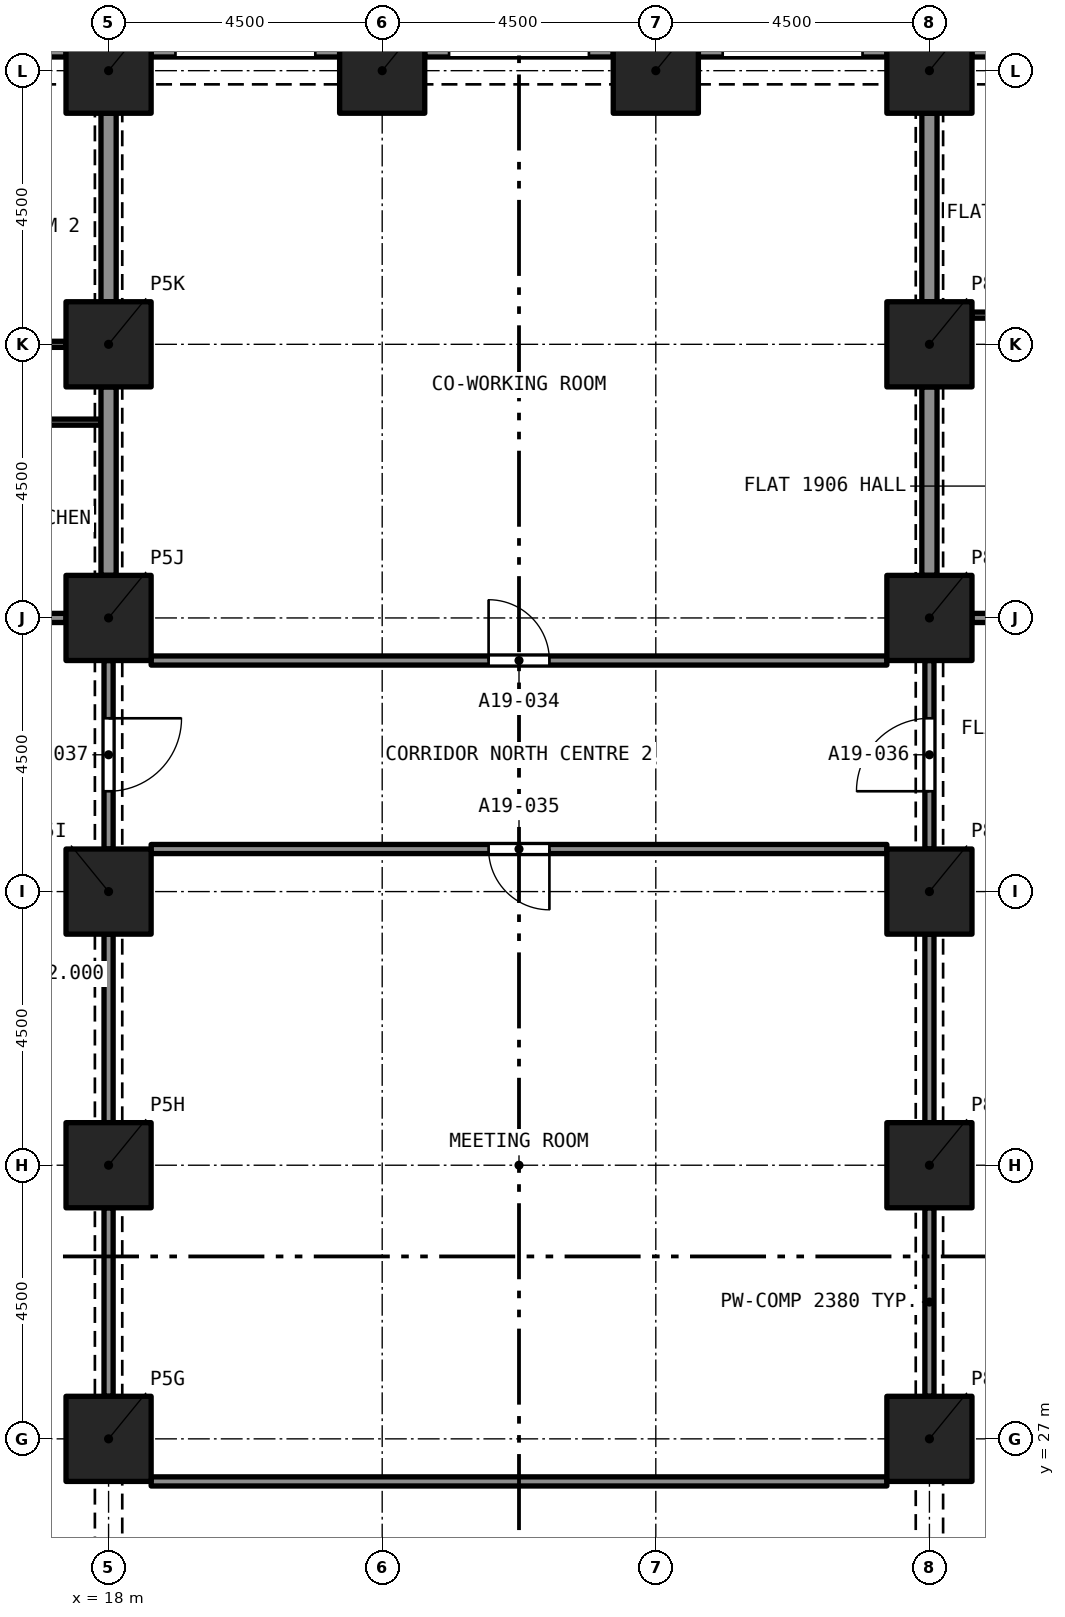
"""IFC4 building model, lengths in metres.
Left out: names, types, materials, properties, quantities, classifications, styles, units other than length and angle.
Written with IfcOpenShell. Run it as: python <this file> out.ifc"""

import sys

from ifc_helpers import new_model, si_unit, direction, frame, frame_2d, origin, origin_2d, place, context, subcontext, project, spatial, rectangle, extrude, element, fill, save


model = new_model("IFC4")
c1 = context("Model", 3, precision=1e-05, world=origin(), true_north=direction((0.0, 1.0)))
c2 = subcontext(c1, "Body", "Model", "MODEL_VIEW")
j1 = project(units=[si_unit("LENGTHUNIT", "METRE"), si_unit("PLANEANGLEUNIT", "RADIAN")], contexts=[c1])
p1 = place(None, origin())
s1 = spatial("IfcSite", under=j1, at=p1, CompositionType="ELEMENT")
p2 = place(p1, origin())
s2 = spatial("IfcBuilding", under=s1, at=p2, CompositionType="ELEMENT")
p3 = place(p2, frame((0.0, 0.0, 72.0)))
s3 = spatial("IfcBuildingStorey", under=s2, at=p3, CompositionType="ELEMENT", Elevation=72.0)
for number, where, z_axis, x_axis in (
    (1, (18.0, 27.0, 0.0), (0.0, 0.0, 1.0), (1.0, 0.0, 0.0)),
    (2, (31.5, 27.0, 0.0), (0.0, 0.0, 1.0), (1.0, 0.0, 0.0)),
    (3, (18.0, 31.5, 0.0), (0.0, 0.0, 1.0), (1.0, 0.0, 0.0)),
    (4, (31.5, 31.5, 0.0), (0.0, 0.0, 1.0), (1.0, 0.0, 0.0)),
    (5, (18.0, 36.0, 0.0), (0.0, 0.0, 1.0), (1.0, 0.0, 0.0)),
    (6, (31.5, 36.0, 0.0), (0.0, 0.0, 1.0), (1.0, 0.0, 0.0)),
    (7, (18.0, 40.5, 0.0), (0.0, 0.0, 1.0), (1.0, 0.0, 0.0)),
    (8, (31.5, 40.5, 0.0), (0.0, 0.0, 1.0), (1.0, 0.0, 0.0)),
    (9, (18.0, 45.0, 0.0), (0.0, 0.0, 1.0), (1.0, 0.0, 0.0)),
    (10, (31.5, 45.0, 0.0), (0.0, 0.0, 1.0), (1.0, 0.0, 0.0)),
    (11, (18.0, 49.5, 0.0), (0.0, 0.0, 1.0), (1.0, 0.0, 0.0)),
    (12, (22.5, 49.5, 0.0), (0.0, 0.0, 1.0), (1.0, 0.0, 0.0)),
    (13, (27.0, 49.5, 0.0), (0.0, 0.0, 1.0), (1.0, 0.0, 0.0)),
    (14, (31.5, 49.5, 0.0), (0.0, 0.0, 1.0), (1.0, 0.0, 0.0)),
):
    element("IfcColumn", number, at=place(p3, frame(where, z_axis=z_axis, x_axis=x_axis)), inside=s3, PredefinedType="COLUMN", context=c2, shape_type="SweptSolid", body=[
        extrude(rectangle(XDim=1.4, YDim=1.4, at=origin_2d()), origin(), (0.0, 0.0, 1.0), 3.2),
    ])
p4 = place(p3, frame((32.2, 49.875, 0.0), z_axis=(0.0, 0.0, 1.0), x_axis=(1.0, 0.0, 0.0)))
e15 = element("IfcWall", 15, at=p4, inside=s3, PredefinedType="SOLIDWALL", context=c2, shape_type="SweptSolid", body=[
    extrude(rectangle(XDim=3.1, YDim=0.3, at=frame_2d((1.55, 0.0))), origin(), (0.0, 0.0, 1.0), 3.2),
])
p5 = place(p4, frame((0.4, 0.0, 0.45)))
e16 = element("IfcOpeningElement", 16, at=p5, cuts=e15, PredefinedType="OPENING", context=c2, shape_type="SweptSolid", body=[
    extrude(rectangle(XDim=2.3, YDim=1.95, at=frame_2d((1.15, 0.975))), frame((0.0, 0.16, 0.0), z_axis=(0.0, -1.0, 0.0), x_axis=(1.0, 0.0, 0.0)), (0.0, 0.0, 1.0), 0.32),
])
p6 = place(p3, frame((27.7, 49.875, 0.0), z_axis=(0.0, 0.0, 1.0), x_axis=(1.0, 0.0, 0.0)))
e17 = element("IfcWall", 17, at=p6, inside=s3, PredefinedType="SOLIDWALL", context=c2, shape_type="SweptSolid", body=[
    extrude(rectangle(XDim=3.1, YDim=0.3, at=frame_2d((1.55, 0.0))), origin(), (0.0, 0.0, 1.0), 3.2),
])
p7 = place(p6, frame((0.4, 0.0, 0.45)))
e18 = element("IfcOpeningElement", 18, at=p7, cuts=e17, PredefinedType="OPENING", context=c2, shape_type="SweptSolid", body=[
    extrude(rectangle(XDim=2.3, YDim=1.95, at=frame_2d((1.15, 0.975))), frame((0.0, 0.16, 0.0), z_axis=(0.0, -1.0, 0.0), x_axis=(1.0, 0.0, 0.0)), (0.0, 0.0, 1.0), 0.32),
])
p8 = place(p3, frame((23.2, 49.875, 0.0), z_axis=(0.0, 0.0, 1.0), x_axis=(1.0, 0.0, 0.0)))
e19 = element("IfcWall", 19, at=p8, inside=s3, PredefinedType="SOLIDWALL", context=c2, shape_type="SweptSolid", body=[
    extrude(rectangle(XDim=3.1, YDim=0.3, at=frame_2d((1.55, 0.0))), origin(), (0.0, 0.0, 1.0), 3.2),
])
p9 = place(p8, frame((0.4, 0.0, 0.45)))
e20 = element("IfcOpeningElement", 20, at=p9, cuts=e19, PredefinedType="OPENING", context=c2, shape_type="SweptSolid", body=[
    extrude(rectangle(XDim=2.3, YDim=1.95, at=frame_2d((1.15, 0.975))), frame((0.0, 0.16, 0.0), z_axis=(0.0, -1.0, 0.0), x_axis=(1.0, 0.0, 0.0)), (0.0, 0.0, 1.0), 0.32),
])
p10 = place(p3, frame((18.7, 49.875, 0.0), z_axis=(0.0, 0.0, 1.0), x_axis=(1.0, 0.0, 0.0)))
e21 = element("IfcWall", 21, at=p10, inside=s3, PredefinedType="SOLIDWALL", context=c2, shape_type="SweptSolid", body=[
    extrude(rectangle(XDim=3.1, YDim=0.3, at=frame_2d((1.55, 0.0))), origin(), (0.0, 0.0, 1.0), 3.2),
])
p11 = place(p10, frame((0.4, 0.0, 0.45)))
e22 = element("IfcOpeningElement", 22, at=p11, cuts=e21, PredefinedType="OPENING", context=c2, shape_type="SweptSolid", body=[
    extrude(rectangle(XDim=2.3, YDim=1.95, at=frame_2d((1.15, 0.975))), frame((0.0, 0.16, 0.0), z_axis=(0.0, -1.0, 0.0), x_axis=(1.0, 0.0, 0.0)), (0.0, 0.0, 1.0), 0.32),
])
p12 = place(p3, frame((14.2, 49.875, 0.0), z_axis=(0.0, 0.0, 1.0), x_axis=(1.0, 0.0, 0.0)))
e23 = element("IfcWall", 23, at=p12, inside=s3, PredefinedType="SOLIDWALL", context=c2, shape_type="SweptSolid", body=[
    extrude(rectangle(XDim=3.1, YDim=0.3, at=frame_2d((1.55, 0.0))), origin(), (0.0, 0.0, 1.0), 3.2),
])
p13 = place(p12, frame((0.4, 0.0, 0.45)))
e24 = element("IfcOpeningElement", 24, at=p13, cuts=e23, PredefinedType="OPENING", context=c2, shape_type="SweptSolid", body=[
    extrude(rectangle(XDim=2.3, YDim=1.95, at=frame_2d((1.15, 0.975))), frame((0.0, 0.16, 0.0), z_axis=(0.0, -1.0, 0.0), x_axis=(1.0, 0.0, 0.0)), (0.0, 0.0, 1.0), 0.32),
])
p14 = place(p3, frame((13.5, 40.5, 0.0), z_axis=(0.0, 0.0, 1.0), x_axis=(1.0, 0.0, 0.0)))
e25 = element("IfcWall", 25, at=p14, inside=s3, PredefinedType="PARTITIONING", context=c2, shape_type="SweptSolid", body=[
    extrude(rectangle(XDim=3.8, YDim=0.15, at=frame_2d((1.9, 0.0))), origin(), (0.0, 0.0, 1.0), 2.7),
])
p15 = place(p3, frame((13.5, 45.0, 0.0), z_axis=(0.0, 0.0, 1.0), x_axis=(1.0, 0.0, 0.0)))
e26 = element("IfcWall", 26, at=p15, inside=s3, PredefinedType="PARTITIONING", context=c2, shape_type="SweptSolid", body=[
    extrude(rectangle(XDim=3.8, YDim=0.1, at=frame_2d((1.9, 0.0))), origin(), (0.0, 0.0, 1.0), 2.7),
])
p16 = place(p15, frame((1.8, 0.0, 0.0)))
e27 = element("IfcOpeningElement", 27, at=p16, cuts=e26, PredefinedType="OPENING", context=c2, shape_type="SweptSolid", body=[
    extrude(rectangle(XDim=0.9, YDim=2.1, at=frame_2d((0.45, 1.05))), frame((0.0, 0.06, 0.0), z_axis=(0.0, -1.0, 0.0), x_axis=(1.0, 0.0, 0.0)), (0.0, 0.0, 1.0), 0.12),
])
p17 = place(p3, frame((18.0, 45.7, 0.0), z_axis=(0.0, 0.0, 1.0), x_axis=(0.0, 1.0, 0.0)))
e28 = element("IfcWall", 28, at=p17, inside=s3, PredefinedType="PARTITIONING", context=c2, shape_type="SweptSolid", body=[
    extrude(rectangle(XDim=3.1, YDim=0.25, at=frame_2d((1.55, 0.0))), origin(), (0.0, 0.0, 1.0), 2.38),
])
p18 = place(p3, frame((17.875, 43.72, 0.0), z_axis=(0.0, 0.0, 1.0), x_axis=(-1.0, 0.0, 0.0)))
e29 = element("IfcWall", 29, at=p18, inside=s3, PredefinedType="PARTITIONING", context=c2, shape_type="SweptSolid", body=[
    extrude(rectangle(XDim=3.58, YDim=0.1, at=frame_2d((1.79, 0.0))), origin(), (0.0, 0.0, 1.0), 2.7),
])
p19 = place(p18, frame((1.277, 0.0, 0.0)))
e30 = element("IfcOpeningElement", 30, at=p19, cuts=e29, PredefinedType="OPENING", context=c2, shape_type="SweptSolid", body=[
    extrude(rectangle(XDim=0.9, YDim=2.1, at=frame_2d((0.45, 1.05))), frame((0.0, 0.06, 0.0), z_axis=(0.0, -1.0, 0.0), x_axis=(1.0, 0.0, 0.0)), (0.0, 0.0, 1.0), 0.12),
])
p20 = place(p3, frame((18.0, 41.2, 0.0), z_axis=(0.0, 0.0, 1.0), x_axis=(0.0, 1.0, 0.0)))
e31 = element("IfcWall", 31, at=p20, inside=s3, PredefinedType="PARTITIONING", context=c2, shape_type="SweptSolid", body=[
    extrude(rectangle(XDim=3.1, YDim=0.25, at=frame_2d((1.55, 0.0))), origin(), (0.0, 0.0, 1.0), 2.38),
])
p21 = place(p3, frame((32.2, 45.48, 0.0), z_axis=(0.0, 0.0, 1.0), x_axis=(1.0, 0.0, 0.0)))
e32 = element("IfcWall", 32, at=p21, inside=s3, PredefinedType="PARTITIONING", context=c2, shape_type="SweptSolid", body=[
    extrude(rectangle(XDim=3.8, YDim=0.1, at=frame_2d((1.9, 0.0))), origin(), (0.0, 0.0, 1.0), 2.7),
])
p22 = place(p21, frame((1.05, 0.0, 0.0)))
e33 = element("IfcOpeningElement", 33, at=p22, cuts=e32, PredefinedType="OPENING", context=c2, shape_type="SweptSolid", body=[
    extrude(rectangle(XDim=1.0, YDim=2.1, at=frame_2d((0.5, 1.05))), frame((0.0, 0.06, 0.0), z_axis=(0.0, -1.0, 0.0), x_axis=(1.0, 0.0, 0.0)), (0.0, 0.0, 1.0), 0.12),
])
p23 = place(p3, frame((31.5, 41.2, 0.0), z_axis=(0.0, 0.0, 1.0), x_axis=(0.0, 1.0, 0.0)))
e34 = element("IfcWall", 34, at=p23, inside=s3, PredefinedType="PARTITIONING", context=c2, shape_type="SweptSolid", body=[
    extrude(rectangle(XDim=3.1, YDim=0.25, at=frame_2d((1.55, 0.0))), origin(), (0.0, 0.0, 1.0), 2.38),
])
p24 = place(p3, frame((32.2, 40.5, 0.0), z_axis=(0.0, 0.0, 1.0), x_axis=(1.0, 0.0, 0.0)))
e35 = element("IfcWall", 35, at=p24, inside=s3, PredefinedType="PARTITIONING", context=c2, shape_type="SweptSolid", body=[
    extrude(rectangle(XDim=2.3, YDim=0.15, at=frame_2d((1.15, 0.0))), origin(), (0.0, 0.0, 1.0), 2.7),
])
p25 = place(p24, frame((1.05, 0.0, 0.0)))
e36 = element("IfcOpeningElement", 36, at=p25, cuts=e35, PredefinedType="OPENING", context=c2, shape_type="SweptSolid", body=[
    extrude(rectangle(XDim=1.0, YDim=2.1, at=frame_2d((0.5, 1.05))), frame((0.0, 0.085, 0.0), z_axis=(0.0, -1.0, 0.0), x_axis=(1.0, 0.0, 0.0)), (0.0, 0.0, 1.0), 0.17),
])
p26 = place(p3, frame((31.5, 45.7, 0.0), z_axis=(0.0, 0.0, 1.0), x_axis=(0.0, 1.0, 0.0)))
e37 = element("IfcWall", 37, at=p26, inside=s3, PredefinedType="PARTITIONING", context=c2, shape_type="SweptSolid", body=[
    extrude(rectangle(XDim=3.1, YDim=0.25, at=frame_2d((1.55, 0.0))), origin(), (0.0, 0.0, 1.0), 2.38),
])
p27 = place(p3, frame((18.7, 39.8, 0.0), z_axis=(0.0, 0.0, 1.0), x_axis=(1.0, 0.0, 0.0)))
e38 = element("IfcWall", 38, at=p27, inside=s3, PredefinedType="PARTITIONING", context=c2, shape_type="SweptSolid", body=[
    extrude(rectangle(XDim=12.1, YDim=0.15, at=frame_2d((6.05, 0.0))), origin(), (0.0, 0.0, 1.0), 2.7),
])
p28 = place(p27, frame((5.55, 0.0, 0.0)))
e39 = element("IfcOpeningElement", 39, at=p28, cuts=e38, PredefinedType="OPENING", context=c2, shape_type="SweptSolid", body=[
    extrude(rectangle(XDim=1.0, YDim=2.1, at=frame_2d((0.5, 1.05))), frame((0.0, 0.085, 0.0), z_axis=(0.0, -1.0, 0.0), x_axis=(1.0, 0.0, 0.0)), (0.0, 0.0, 1.0), 0.17),
])
p29 = place(p3, frame((30.8, 36.7, 0.0), z_axis=(0.0, 0.0, 1.0), x_axis=(-1.0, 0.0, 0.0)))
e40 = element("IfcWall", 40, at=p29, inside=s3, PredefinedType="PARTITIONING", context=c2, shape_type="SweptSolid", body=[
    extrude(rectangle(XDim=12.1, YDim=0.15, at=frame_2d((6.05, 0.0))), origin(), (0.0, 0.0, 1.0), 2.7),
])
p30 = place(p29, frame((5.55, 0.0, 0.0)))
e41 = element("IfcOpeningElement", 41, at=p30, cuts=e40, PredefinedType="OPENING", context=c2, shape_type="SweptSolid", body=[
    extrude(rectangle(XDim=1.0, YDim=2.1, at=frame_2d((0.5, 1.05))), frame((0.0, 0.085, 0.0), z_axis=(0.0, -1.0, 0.0), x_axis=(1.0, 0.0, 0.0)), (0.0, 0.0, 1.0), 0.17),
])
p31 = place(p3, frame((31.5, 36.7, 0.0), z_axis=(0.0, 0.0, 1.0), x_axis=(0.0, 1.0, 0.0)))
e42 = element("IfcWall", 42, at=p31, inside=s3, PredefinedType="PARTITIONING", context=c2, shape_type="SweptSolid", body=[
    extrude(rectangle(XDim=3.1, YDim=0.15, at=frame_2d((1.55, 0.0))), origin(), (0.0, 0.0, 1.0), 2.38),
])
p32 = place(p31, frame((0.95, 0.0, 0.0)))
e43 = element("IfcOpeningElement", 43, at=p32, cuts=e42, PredefinedType="OPENING", context=c2, shape_type="SweptSolid", body=[
    extrude(rectangle(XDim=1.2, YDim=2.1, at=frame_2d((0.6, 1.05))), frame((0.0, 0.085, 0.0), z_axis=(0.0, -1.0, 0.0), x_axis=(1.0, 0.0, 0.0)), (0.0, 0.0, 1.0), 0.17),
])
p33 = place(p3, frame((18.0, 39.8, 0.0), z_axis=(0.0, 0.0, 1.0), x_axis=(0.0, -1.0, 0.0)))
e44 = element("IfcWall", 44, at=p33, inside=s3, PredefinedType="PARTITIONING", context=c2, shape_type="SweptSolid", body=[
    extrude(rectangle(XDim=3.1, YDim=0.15, at=frame_2d((1.55, 0.0))), origin(), (0.0, 0.0, 1.0), 2.38),
])
p34 = place(p33, frame((0.95, 0.0, 0.0)))
e45 = element("IfcOpeningElement", 45, at=p34, cuts=e44, PredefinedType="OPENING", context=c2, shape_type="SweptSolid", body=[
    extrude(rectangle(XDim=1.2, YDim=2.1, at=frame_2d((0.6, 1.05))), frame((0.0, 0.085, 0.0), z_axis=(0.0, -1.0, 0.0), x_axis=(1.0, 0.0, 0.0)), (0.0, 0.0, 1.0), 0.17),
])
for number, where, z_axis, x_axis in (
    (46, (31.5, 32.2, 0.0), (0.0, 0.0, 1.0), (0.0, 1.0, 0.0)),
    (47, (31.5, 27.7, 0.0), (0.0, 0.0, 1.0), (0.0, 1.0, 0.0)),
    (48, (18.0, 27.7, 0.0), (0.0, 0.0, 1.0), (0.0, 1.0, 0.0)),
    (49, (18.0, 32.2, 0.0), (0.0, 0.0, 1.0), (0.0, 1.0, 0.0)),
):
    element("IfcWall", number, at=place(p3, frame(where, z_axis=z_axis, x_axis=x_axis)), inside=s3, PredefinedType="PARTITIONING", context=c2, shape_type="SweptSolid", body=[
        extrude(rectangle(XDim=3.1, YDim=0.15, at=frame_2d((1.55, 0.0))), origin(), (0.0, 0.0, 1.0), 2.38),
    ])
p35 = place(p3, frame((18.7, 26.3, 0.0), z_axis=(0.0, 0.0, 1.0), x_axis=(1.0, 0.0, 0.0)))
e50 = element("IfcWall", 50, at=p35, inside=s3, PredefinedType="PARTITIONING", context=c2, shape_type="SweptSolid", body=[
    extrude(rectangle(XDim=12.1, YDim=0.15, at=frame_2d((6.05, 0.0))), origin(), (0.0, 0.0, 1.0), 2.7),
])
p36 = place(p28, origin())
e51 = element("IfcDoor", 51, at=p36, inside=s3, OperationType="SINGLE_SWING_RIGHT", PredefinedType="DOOR", context=c2, shape_type="SweptSolid", body=[
    extrude(rectangle(XDim=1.0, YDim=2.1, at=frame_2d((0.5, 1.05))), frame((0.0, 0.025, 0.0), z_axis=(0.0, -1.0, 0.0), x_axis=(1.0, 0.0, 0.0)), (0.0, 0.0, 1.0), 0.05),
])
fill(e39, e51)
p37 = place(p30, origin())
e52 = element("IfcDoor", 52, at=p37, inside=s3, OperationType="SINGLE_SWING_RIGHT", PredefinedType="DOOR", context=c2, shape_type="SweptSolid", body=[
    extrude(rectangle(XDim=1.0, YDim=2.1, at=frame_2d((0.5, 1.05))), frame((0.0, 0.025, 0.0), z_axis=(0.0, -1.0, 0.0), x_axis=(1.0, 0.0, 0.0)), (0.0, 0.0, 1.0), 0.05),
])
fill(e41, e52)
p38 = place(p32, origin())
e53 = element("IfcDoor", 53, at=p38, inside=s3, OperationType="SINGLE_SWING_LEFT", PredefinedType="DOOR", context=c2, shape_type="SweptSolid", body=[
    extrude(rectangle(XDim=1.2, YDim=2.1, at=frame_2d((0.6, 1.05))), frame((0.0, 0.025, 0.0), z_axis=(0.0, -1.0, 0.0), x_axis=(1.0, 0.0, 0.0)), (0.0, 0.0, 1.0), 0.05),
])
fill(e43, e53)
p39 = place(p34, origin())
e54 = element("IfcDoor", 54, at=p39, inside=s3, OperationType="SINGLE_SWING_LEFT", PredefinedType="DOOR", context=c2, shape_type="SweptSolid", body=[
    extrude(rectangle(XDim=1.2, YDim=2.1, at=frame_2d((0.6, 1.05))), frame((0.0, 0.025, 0.0), z_axis=(0.0, -1.0, 0.0), x_axis=(1.0, 0.0, 0.0)), (0.0, 0.0, 1.0), 0.05),
])
fill(e45, e54)
save(model, sys.argv[1])
